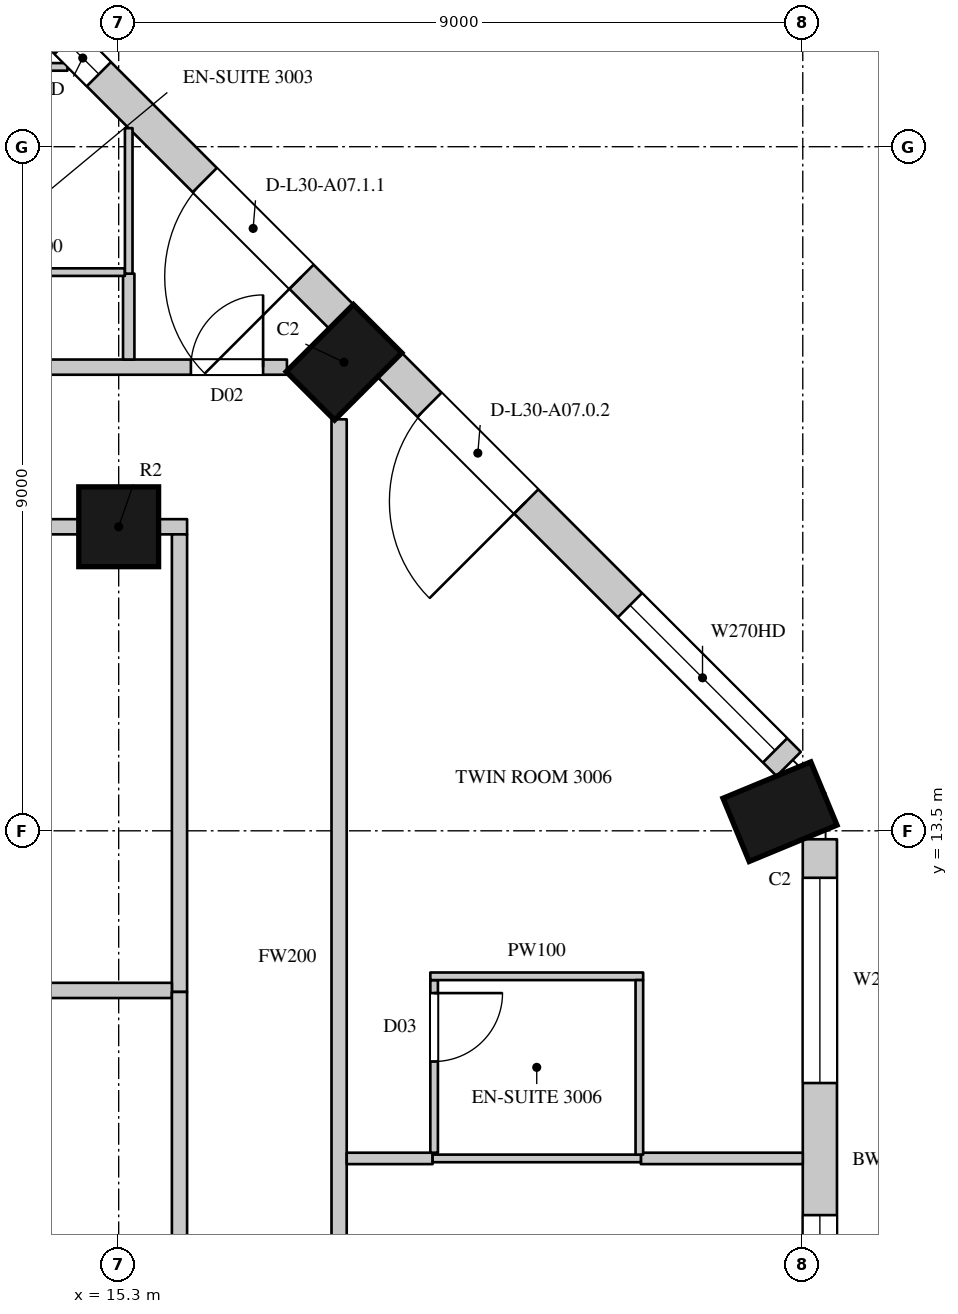
"""IFC4 building model, lengths in metres.
Left out: names, types, materials, properties, quantities, classifications, styles, units other than length and angle.
Written with IfcOpenShell. Run it as: python <this file> out.ifc"""

import sys

from ifc_helpers import new_model, si_unit, direction, frame, frame_2d, origin, origin_2d, place, context, subcontext, project, spatial, rectangle, circle, extrude, element, fill, save


model = new_model("IFC4")
c1 = context("Model", 3, precision=1e-05, world=origin(), true_north=direction((0.0, 1.0)))
c2 = subcontext(c1, "Body", "Model", "MODEL_VIEW")
j1 = project(units=[si_unit("LENGTHUNIT", "METRE"), si_unit("PLANEANGLEUNIT", "RADIAN")], contexts=[c1])
p1 = place(None, origin())
s1 = spatial("IfcSite", under=j1, at=p1, CompositionType="ELEMENT")
p2 = place(p1, origin())
s2 = spatial("IfcBuilding", under=s1, at=p2, CompositionType="ELEMENT")
p3 = place(p2, frame((0.0, 0.0, 138.3)))
s3 = spatial("IfcBuildingStorey", under=s2, at=p3, CompositionType="ELEMENT", Elevation=138.3)
for number, where, z_axis, x_axis in (
    (1, (24.0, 13.752, 0.0), (0.0, 0.0, 1.0), (-0.383, 0.924, 0.0)),
    (2, (18.264, 19.664, 0.0), (0.0, 0.0, 1.0), (-0.707, 0.707, 0.0)),
):
    element("IfcColumn", number, at=place(p3, frame(where, z_axis=z_axis, x_axis=x_axis)), inside=s3, PredefinedType="COLUMN", context=c2, shape_type="SweptSolid", body=[
        extrude(rectangle(XDim=0.9, YDim=1.25, at=origin_2d()), origin(), (0.0, 0.0, 1.0), 3.6),
    ])
p4 = place(p3, frame((15.3, 17.5, 0.0), z_axis=(0.0, 0.0, 1.0), x_axis=(1.0, 0.0, 0.0)))
e3 = element("IfcColumn", 3, at=p4, inside=s3, PredefinedType="COLUMN", context=c2, shape_type="SweptSolid", body=[
    extrude(circle(Radius=0.525, at=origin_2d()), origin(), (0.0, 0.0, 1.0), 3.6),
])
p5 = place(p3, frame((24.525, 4.95, 0.0), z_axis=(0.0, 0.0, 1.0), x_axis=(0.0, 1.0, 0.0)))
e4 = element("IfcWall", 4, at=p5, inside=s3, PredefinedType="SOLIDWALL", context=c2, shape_type="SweptSolid", body=[
    extrude(rectangle(XDim=8.439, YDim=0.45, at=frame_2d((4.219, 0.0))), origin(), (0.0, 0.0, 1.0), 3.3),
])
p6 = place(p5, frame((0.294, 0.0, 0.0)))
e5 = element("IfcOpeningElement", 5, at=p6, cuts=e4, PredefinedType="OPENING", context=c2, shape_type="SweptSolid", body=[
    extrude(rectangle(XDim=1.8, YDim=2.4, at=frame_2d((0.9, 1.2))), frame((0.0, 0.235, 0.0), z_axis=(0.0, -1.0, 0.0), x_axis=(1.0, 0.0, 0.0)), (0.0, 0.0, 1.0), 0.47),
])
p7 = place(p5, frame((2.294, 0.0, 1.05)))
e6 = element("IfcOpeningElement", 6, at=p7, cuts=e4, PredefinedType="OPENING", context=c2, shape_type="SweptSolid", body=[
    extrude(rectangle(XDim=1.2, YDim=2.0, at=frame_2d((0.6, 1.0))), frame((0.0, 0.235, 0.0), z_axis=(0.0, -1.0, 0.0), x_axis=(1.0, 0.0, 0.0)), (0.0, 0.0, 1.0), 0.47),
])
p8 = place(p5, frame((5.232, 0.0, 1.05)))
e7 = element("IfcOpeningElement", 7, at=p8, cuts=e4, PredefinedType="OPENING", context=c2, shape_type="SweptSolid", body=[
    extrude(rectangle(XDim=2.7, YDim=2.0, at=frame_2d((1.35, 1.0))), frame((0.0, 0.235, 0.0), z_axis=(0.0, -1.0, 0.0), x_axis=(1.0, 0.0, 0.0)), (0.0, 0.0, 1.0), 0.47),
])
p9 = place(p3, frame((24.115, 14.379, 0.0), z_axis=(0.0, 0.0, 1.0), x_axis=(-0.707106781187, 0.707106781187, 0.0)))
e8 = element("IfcWall", 8, at=p9, inside=s3, PredefinedType="SOLIDWALL", context=c2, shape_type="SweptSolid", body=[
    extrude(rectangle(XDim=7.424, YDim=0.45, at=frame_2d((3.712, 0.0))), origin(), (0.0, 0.0, 1.0), 3.3),
])
p10 = place(p9, frame((0.253, 0.0, 1.05)))
e9 = element("IfcOpeningElement", 9, at=p10, cuts=e8, PredefinedType="OPENING", context=c2, shape_type="SweptSolid", body=[
    extrude(rectangle(XDim=2.7, YDim=2.0, at=frame_2d((1.35, 1.0))), frame((0.0, 0.235, 0.0), z_axis=(0.0, -1.0, 0.0), x_axis=(1.0, 0.0, 0.0)), (0.0, 0.0, 1.0), 0.47),
])
p11 = place(p9, frame((4.884, 0.0, 0.0)))
e10 = element("IfcOpeningElement", 10, at=p11, cuts=e8, PredefinedType="OPENING", context=c2, shape_type="SweptSolid", body=[
    extrude(rectangle(XDim=1.8, YDim=2.4, at=frame_2d((0.9, 1.2))), frame((0.0, 0.235, 0.0), z_axis=(0.0, -1.0, 0.0), x_axis=(1.0, 0.0, 0.0)), (0.0, 0.0, 1.0), 0.47),
])
p12 = place(p3, frame((18.229, 20.265, 0.0), z_axis=(0.0, 0.0, 1.0), x_axis=(-0.707106781187, 0.707106781187, 0.0)))
e11 = element("IfcWall", 11, at=p12, inside=s3, PredefinedType="SOLIDWALL", context=c2, shape_type="SweptSolid", body=[
    extrude(rectangle(XDim=7.424, YDim=0.45, at=frame_2d((3.712, 0.0))), origin(), (0.0, 0.0, 1.0), 3.3),
])
p13 = place(p12, frame((0.74, 0.0, 0.0)))
e12 = element("IfcOpeningElement", 12, at=p13, cuts=e11, PredefinedType="OPENING", context=c2, shape_type="SweptSolid", body=[
    extrude(rectangle(XDim=1.8, YDim=2.4, at=frame_2d((0.9, 1.2))), frame((0.0, 0.235, 0.0), z_axis=(0.0, -1.0, 0.0), x_axis=(1.0, 0.0, 0.0)), (0.0, 0.0, 1.0), 0.47),
])
p14 = place(p12, frame((4.51, 0.0, 1.05)))
e13 = element("IfcOpeningElement", 13, at=p14, cuts=e11, PredefinedType="OPENING", context=c2, shape_type="SweptSolid", body=[
    extrude(rectangle(XDim=0.6, YDim=2.0, at=frame_2d((0.3, 1.0))), frame((0.0, 0.235, 0.0), z_axis=(0.0, -1.0, 0.0), x_axis=(1.0, 0.0, 0.0)), (0.0, 0.0, 1.0), 0.47),
])
p15 = place(p12, frame((5.861, 0.0, 1.05)))
e14 = element("IfcOpeningElement", 14, at=p15, cuts=e11, PredefinedType="OPENING", context=c2, shape_type="SweptSolid", body=[
    extrude(rectangle(XDim=1.2, YDim=2.0, at=frame_2d((0.6, 1.0))), frame((0.0, 0.235, 0.0), z_axis=(0.0, -1.0, 0.0), x_axis=(1.0, 0.0, 0.0)), (0.0, 0.0, 1.0), 0.47),
])
p16 = place(p3, frame((23.15, 16.864, 0.0), z_axis=(0.0, 0.0, 1.0), x_axis=(-0.707106781187, 0.707106781187, 0.0)))
e15 = element("IfcWall", 15, at=p16, inside=s3, PredefinedType="SOLIDWALL", context=c2, shape_type="SweptSolid", body=[
    extrude(rectangle(XDim=1.445, YDim=0.45, at=frame_2d((0.722, 0.0))), origin(), (0.0, 0.0, 1.0), 0.6),
])
p17 = place(p3, frame((19.937, 20.078, 0.0), z_axis=(0.0, 0.0, 1.0), x_axis=(-0.707106781187, 0.707106781187, 0.0)))
e16 = element("IfcWall", 16, at=p17, inside=s3, PredefinedType="SOLIDWALL", context=c2, shape_type="SweptSolid", body=[
    extrude(rectangle(XDim=1.781, YDim=0.45, at=frame_2d((0.89, 0.0))), origin(), (0.0, 0.0, 1.0), 0.6),
])
p18 = place(p3, frame((16.486, 23.529, 0.0), z_axis=(0.0, 0.0, 1.0), x_axis=(-0.707022305137, 0.707191247145, 0.0)))
e17 = element("IfcWall", 17, at=p18, inside=s3, PredefinedType="SOLIDWALL", context=c2, shape_type="SweptSolid", body=[
    extrude(rectangle(XDim=1.445, YDim=0.45, at=frame_2d((0.723, 0.0))), origin(), (0.0, 0.0, 1.0), 0.6),
])
p19 = place(p3, frame((-20.7, 19.6, 0.0), z_axis=(0.0, 0.0, 1.0), x_axis=(1.0, 0.0, 0.0)))
e18 = element("IfcWall", 18, at=p19, inside=s3, PredefinedType="PARTITIONING", context=c2, shape_type="SweptSolid", body=[
    extrude(rectangle(XDim=38.214, YDim=0.2, at=frame_2d((19.107, 0.0))), origin(), (0.0, 0.0, 1.0), 3.3),
])
p20 = place(p19, frame((23.95, 0.0, 0.0)))
e19 = element("IfcOpeningElement", 19, at=p20, cuts=e18, PredefinedType="OPENING", context=c2, shape_type="SweptSolid", body=[
    extrude(rectangle(XDim=0.9, YDim=2.2, at=frame_2d((0.45, 1.1))), frame((0.0, 0.11, 0.0), z_axis=(0.0, -1.0, 0.0), x_axis=(1.0, 0.0, 0.0)), (0.0, 0.0, 1.0), 0.22),
])
p21 = place(p19, frame((2.05, 0.0, 0.0)))
e20 = element("IfcOpeningElement", 20, at=p21, cuts=e18, PredefinedType="OPENING", context=c2, shape_type="SweptSolid", body=[
    extrude(rectangle(XDim=1.1, YDim=2.4, at=frame_2d((0.55, 1.2))), frame((0.0, 0.11, 0.0), z_axis=(0.0, -1.0, 0.0), x_axis=(1.0, 0.0, 0.0)), (0.0, 0.0, 1.0), 0.22),
])
p22 = place(p19, frame((12.15, 0.0, 0.0)))
e21 = element("IfcOpeningElement", 21, at=p22, cuts=e18, PredefinedType="OPENING", context=c2, shape_type="SweptSolid", body=[
    extrude(rectangle(XDim=1.1, YDim=2.4, at=frame_2d((0.55, 1.2))), frame((0.0, 0.11, 0.0), z_axis=(0.0, -1.0, 0.0), x_axis=(1.0, 0.0, 0.0)), (0.0, 0.0, 1.0), 0.22),
])
p23 = place(p19, frame((30.2, 0.0, 0.0)))
e22 = element("IfcOpeningElement", 22, at=p23, cuts=e18, PredefinedType="OPENING", context=c2, shape_type="SweptSolid", body=[
    extrude(rectangle(XDim=0.95, YDim=2.2, at=frame_2d((0.475, 1.1))), frame((0.0, 0.11, 0.0), z_axis=(0.0, -1.0, 0.0), x_axis=(1.0, 0.0, 0.0)), (0.0, 0.0, 1.0), 0.22),
])
p24 = place(p19, frame((36.95, 0.0, 0.0)))
e23 = element("IfcOpeningElement", 23, at=p24, cuts=e18, PredefinedType="OPENING", context=c2, shape_type="SweptSolid", body=[
    extrude(rectangle(XDim=0.95, YDim=2.2, at=frame_2d((0.475, 1.1))), frame((0.0, 0.11, 0.0), z_axis=(0.0, -1.0, 0.0), x_axis=(1.0, 0.0, 0.0)), (0.0, 0.0, 1.0), 0.22),
])
p25 = place(p3, frame((6.825, 17.5, 0.0), z_axis=(0.0, 0.0, 1.0), x_axis=(1.0, 0.0, 0.0)))
e24 = element("IfcWall", 24, at=p25, inside=s3, PredefinedType="PARTITIONING", context=c2, shape_type="SweptSolid", body=[
    extrude(rectangle(XDim=7.95, YDim=0.2, at=frame_2d((3.975, 0.0))), origin(), (0.0, 0.0, 1.0), 2.75),
])
p26 = place(p25, frame((3.8, 0.0, 0.0)))
e25 = element("IfcOpeningElement", 25, at=p26, cuts=e24, PredefinedType="OPENING", context=c2, shape_type="SweptSolid", body=[
    extrude(rectangle(XDim=0.95, YDim=2.2, at=frame_2d((0.475, 1.1))), frame((0.0, 0.11, 0.0), z_axis=(0.0, -1.0, 0.0), x_axis=(1.0, 0.0, 0.0)), (0.0, 0.0, 1.0), 0.22),
])
p27 = place(p3, frame((15.825, 17.5, 0.0), z_axis=(0.0, 0.0, 1.0), x_axis=(1.0, 0.0, 0.0)))
e26 = element("IfcWall", 26, at=p27, inside=s3, PredefinedType="PARTITIONING", context=c2, shape_type="SweptSolid", body=[
    extrude(rectangle(XDim=0.375, YDim=0.2, at=frame_2d((0.188, 0.0))), origin(), (0.0, 0.0, 1.0), 3.3),
])
p28 = place(p3, frame((16.1, 11.38, 0.0), z_axis=(0.0, 0.0, 1.0), x_axis=(0.0, 1.0, 0.0)))
e27 = element("IfcWall", 27, at=p28, inside=s3, PredefinedType="PARTITIONING", context=c2, shape_type="SweptSolid", body=[
    extrude(rectangle(XDim=6.02, YDim=0.2, at=frame_2d((3.01, 0.0))), origin(), (0.0, 0.0, 1.0), 3.3),
])
p29 = place(p3, frame((18.2, 4.75, 0.0), z_axis=(0.0, 0.0, 1.0), x_axis=(0.0, 1.0, 0.0)))
e28 = element("IfcWall", 28, at=p29, inside=s3, PredefinedType="PARTITIONING", context=c2, shape_type="SweptSolid", body=[
    extrude(rectangle(XDim=14.164, YDim=0.2, at=frame_2d((7.082, 0.0))), origin(), (0.0, 0.0, 1.0), 3.3),
])
p30 = place(p29, frame((1.7, 0.0, 0.0)))
e29 = element("IfcOpeningElement", 29, at=p30, cuts=e28, PredefinedType="OPENING", context=c2, shape_type="SweptSolid", body=[
    extrude(rectangle(XDim=0.9, YDim=2.2, at=frame_2d((0.45, 1.1))), frame((0.0, 0.11, 0.0), z_axis=(0.0, -1.0, 0.0), x_axis=(1.0, 0.0, 0.0)), (0.0, 0.0, 1.0), 0.22),
])
p31 = place(p3, frame((15.432, 19.7, 0.0), z_axis=(0.0, 0.0, 1.0), x_axis=(0.0, 1.0, 0.0)))
e30 = element("IfcWall", 30, at=p31, inside=s3, PredefinedType="PARTITIONING", context=c2, shape_type="SweptSolid", body=[
    extrude(rectangle(XDim=1.13, YDim=0.15, at=frame_2d((0.565, 0.0))), origin(), (0.0, 0.0, 1.0), 3.3),
])
p32 = place(p3, frame((18.3, 9.19, 0.0), z_axis=(0.0, 0.0, 1.0), x_axis=(1.0, 0.0, 0.0)))
e31 = element("IfcWall", 31, at=p32, inside=s3, PredefinedType="PARTITIONING", context=c2, shape_type="SweptSolid", body=[
    extrude(rectangle(XDim=1.13, YDim=0.15, at=frame_2d((0.565, 0.0))), origin(), (0.0, 0.0, 1.0), 2.65),
])
p33 = place(p3, frame((22.17, 9.19, 0.0), z_axis=(0.0, 0.0, 1.0), x_axis=(1.0, 0.0, 0.0)))
e32 = element("IfcWall", 32, at=p33, inside=s3, PredefinedType="PARTITIONING", context=c2, shape_type="SweptSolid", body=[
    extrude(rectangle(XDim=2.13, YDim=0.15, at=frame_2d((1.065, 0.0))), origin(), (0.0, 0.0, 1.0), 2.65),
])
p34 = place(p3, frame((10.4, 11.4, 0.0), z_axis=(0.0, 0.0, 1.0), x_axis=(1.0, 0.0, 0.0)))
e33 = element("IfcWall", 33, at=p34, inside=s3, PredefinedType="PARTITIONING", context=c2, shape_type="SweptSolid", body=[
    extrude(rectangle(XDim=5.6, YDim=0.2, at=frame_2d((2.8, 0.0))), origin(), (0.0, 0.0, 1.0), 3.3),
])
p35 = place(p3, frame((16.1, 6.825, 0.0), z_axis=(0.0, 0.0, 1.0), x_axis=(0.0, 1.0, 0.0)))
e34 = element("IfcWall", 34, at=p35, inside=s3, PredefinedType="PARTITIONING", context=c2, shape_type="SweptSolid", body=[
    extrude(rectangle(XDim=4.555, YDim=0.2, at=frame_2d((2.277, 0.0))), origin(), (0.0, 0.0, 1.0), 3.3),
])
p36 = place(p3, frame((12.986, 20.85, 0.0), z_axis=(0.0, 0.0, 1.0), x_axis=(1.0, 0.0, 0.0)))
e35 = element("IfcWall", 35, at=p36, inside=s3, PredefinedType="PARTITIONING", context=c2, shape_type="SweptSolid", body=[
    extrude(rectangle(XDim=2.396, YDim=0.1, at=frame_2d((1.198, 0.0))), origin(), (0.0, 0.0, 1.0), 3.3),
])
p37 = place(p3, frame((12.986, 23.55, 0.0), z_axis=(0.0, 0.0, 1.0), x_axis=(1.0, 0.0, 0.0)))
e36 = element("IfcWall", 36, at=p37, inside=s3, PredefinedType="PARTITIONING", context=c2, shape_type="SweptSolid", body=[
    extrude(rectangle(XDim=1.64, YDim=0.1, at=frame_2d((0.82, 0.0))), origin(), (0.0, 0.0, 1.0), 3.3),
])
p38 = place(p3, frame((15.432, 20.83, 0.0), z_axis=(0.0, 0.0, 1.0), x_axis=(0.0, 1.0, 0.0)))
e37 = element("IfcWall", 37, at=p38, inside=s3, PredefinedType="PARTITIONING", context=c2, shape_type="SweptSolid", body=[
    extrude(rectangle(XDim=1.914, YDim=0.1, at=frame_2d((0.957, 0.0))), origin(), (0.0, 0.0, 1.0), 3.3),
])
p39 = place(p3, frame((19.43, 9.19, 0.0), z_axis=(0.0, 0.0, 1.0), x_axis=(1.0, 0.0, 0.0)))
e38 = element("IfcWall", 38, at=p39, inside=s3, PredefinedType="PARTITIONING", context=c2, shape_type="SweptSolid", body=[
    extrude(rectangle(XDim=2.74, YDim=0.1, at=frame_2d((1.37, 0.0))), origin(), (0.0, 0.0, 1.0), 2.65),
])
p40 = place(p3, frame((19.45, 9.265, 0.0), z_axis=(0.0, 0.0, 1.0), x_axis=(0.0, 1.0, 0.0)))
e39 = element("IfcWall", 39, at=p40, inside=s3, PredefinedType="PARTITIONING", context=c2, shape_type="SweptSolid", body=[
    extrude(rectangle(XDim=2.271, YDim=0.1, at=frame_2d((1.135, 0.0))), origin(), (0.0, 0.0, 1.0), 3.3),
])
p41 = place(p40, frame((1.2, 0.0, 0.0)))
e40 = element("IfcOpeningElement", 40, at=p41, cuts=e39, PredefinedType="OPENING", context=c2, shape_type="SweptSolid", body=[
    extrude(rectangle(XDim=0.9, YDim=2.2, at=frame_2d((0.45, 1.1))), frame((0.0, 0.06, 0.0), z_axis=(0.0, -1.0, 0.0), x_axis=(1.0, 0.0, 0.0)), (0.0, 0.0, 1.0), 0.12),
])
p42 = place(p3, frame((19.4, 11.586, 0.0), z_axis=(0.0, 0.0, 1.0), x_axis=(1.0, 0.0, 0.0)))
e41 = element("IfcWall", 41, at=p42, inside=s3, PredefinedType="PARTITIONING", context=c2, shape_type="SweptSolid", body=[
    extrude(rectangle(XDim=2.8, YDim=0.1, at=frame_2d((1.4, 0.0))), origin(), (0.0, 0.0, 1.0), 3.3),
])
p43 = place(p3, frame((22.15, 9.24, 0.0), z_axis=(0.0, 0.0, 1.0), x_axis=(0.0, 1.0, 0.0)))
e42 = element("IfcWall", 42, at=p43, inside=s3, PredefinedType="PARTITIONING", context=c2, shape_type="SweptSolid", body=[
    extrude(rectangle(XDim=2.296, YDim=0.1, at=frame_2d((1.148, 0.0))), origin(), (0.0, 0.0, 1.0), 3.3),
])
p44 = place(p7, origin())
e43 = element("IfcWindow", 43, at=p44, inside=s3, PartitioningType="SINGLE_PANEL", PredefinedType="WINDOW", context=c2, shape_type="SweptSolid", body=[
    extrude(rectangle(XDim=1.2, YDim=2.0, at=frame_2d((0.6, 1.0))), frame((0.0, 0.135, 0.0), z_axis=(0.0, -1.0, 0.0), x_axis=(1.0, 0.0, 0.0)), (0.0, 0.0, 1.0), 0.06),
])
fill(e6, e43)
p45 = place(p8, origin())
e44 = element("IfcWindow", 44, at=p45, inside=s3, PartitioningType="SINGLE_PANEL", PredefinedType="WINDOW", context=c2, shape_type="SweptSolid", body=[
    extrude(rectangle(XDim=2.7, YDim=2.0, at=frame_2d((1.35, 1.0))), frame((0.0, 0.135, 0.0), z_axis=(0.0, -1.0, 0.0), x_axis=(1.0, 0.0, 0.0)), (0.0, 0.0, 1.0), 0.06),
])
fill(e7, e44)
p46 = place(p10, origin())
e45 = element("IfcWindow", 45, at=p46, inside=s3, PartitioningType="SINGLE_PANEL", PredefinedType="WINDOW", context=c2, shape_type="SweptSolid", body=[
    extrude(rectangle(XDim=2.7, YDim=2.0, at=frame_2d((1.35, 1.0))), frame((0.0, 0.135, 0.0), z_axis=(0.0, -1.0, 0.0), x_axis=(1.0, 0.0, 0.0)), (0.0, 0.0, 1.0), 0.06),
])
fill(e9, e45)
p47 = place(p11, origin())
e46 = element("IfcDoor", 46, at=p47, inside=s3, OperationType="SLIDING_TO_LEFT", PredefinedType="DOOR", context=c2, shape_type="SweptSolid", body=[
    extrude(rectangle(XDim=1.8, YDim=2.4, at=frame_2d((0.9, 1.2))), frame((0.0, 0.13, 0.0), z_axis=(0.0, -1.0, 0.0), x_axis=(1.0, 0.0, 0.0)), (0.0, 0.0, 1.0), 0.05),
])
fill(e10, e46)
p48 = place(p13, origin())
e47 = element("IfcDoor", 47, at=p48, inside=s3, OperationType="SLIDING_TO_LEFT", PredefinedType="DOOR", context=c2, shape_type="SweptSolid", body=[
    extrude(rectangle(XDim=1.8, YDim=2.4, at=frame_2d((0.9, 1.2))), frame((0.0, 0.13, 0.0), z_axis=(0.0, -1.0, 0.0), x_axis=(1.0, 0.0, 0.0)), (0.0, 0.0, 1.0), 0.05),
])
fill(e12, e47)
p49 = place(p24, origin())
e48 = element("IfcDoor", 48, at=p49, inside=s3, OperationType="SINGLE_SWING_RIGHT", PredefinedType="DOOR", context=c2, shape_type="SweptSolid", body=[
    extrude(rectangle(XDim=0.95, YDim=2.2, at=frame_2d((0.475, 1.1))), frame((0.0, 0.025, 0.0), z_axis=(0.0, -1.0, 0.0), x_axis=(1.0, 0.0, 0.0)), (0.0, 0.0, 1.0), 0.05),
])
fill(e23, e48)
p50 = place(p41, origin())
e49 = element("IfcDoor", 49, at=p50, inside=s3, OperationType="SINGLE_SWING_LEFT", PredefinedType="DOOR", context=c2, shape_type="SweptSolid", body=[
    extrude(rectangle(XDim=0.9, YDim=2.2, at=frame_2d((0.45, 1.1))), frame((0.0, 0.025, 0.0), z_axis=(0.0, -1.0, 0.0), x_axis=(1.0, 0.0, 0.0)), (0.0, 0.0, 1.0), 0.05),
])
fill(e40, e49)
p51 = place(p14, origin())
e50 = element("IfcWindow", 50, at=p51, inside=s3, PartitioningType="SINGLE_PANEL", PredefinedType="WINDOW", context=c2, shape_type="SweptSolid", body=[
    extrude(rectangle(XDim=0.6, YDim=2.0, at=frame_2d((0.3, 1.0))), frame((0.0, 0.135, 0.0), z_axis=(0.0, -1.0, 0.0), x_axis=(1.0, 0.0, 0.0)), (0.0, 0.0, 1.0), 0.06),
])
fill(e13, e50)
save(model, sys.argv[1])
